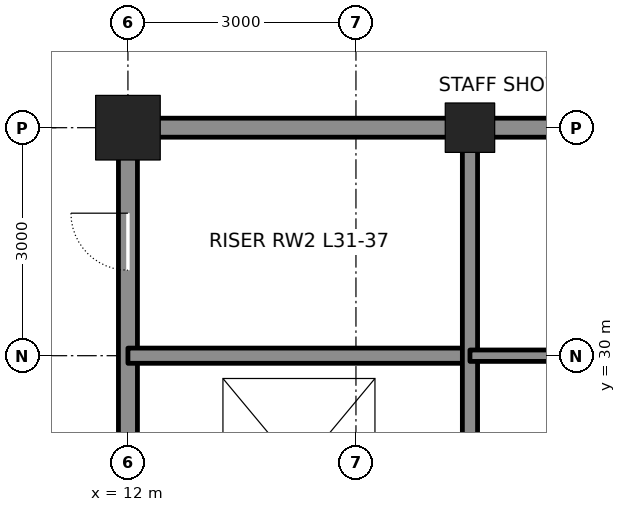
"""IFC4 building model, lengths in metres.
Left out: names, types, materials, properties, quantities, classifications, styles, units other than length and angle.
Written with IfcOpenShell. Run it as: python <this file> out.ifc"""

import sys

from ifc_helpers import new_model, si_unit, direction, frame, frame_2d, origin, origin_2d, place, context, subcontext, project, spatial, rectangle, hollow_rectangle, extrude, element, fill, save


model = new_model("IFC4")
c1 = context("Model", 3, precision=1e-05, world=origin(), true_north=direction((0.0, 1.0)))
c2 = subcontext(c1, "Body", "Model", "MODEL_VIEW")
j1 = project(units=[si_unit("LENGTHUNIT", "METRE"), si_unit("PLANEANGLEUNIT", "RADIAN")], contexts=[c1])
p1 = place(None, origin())
s1 = spatial("IfcSite", under=j1, at=p1, CompositionType="ELEMENT")
p2 = place(p1, origin())
s2 = spatial("IfcBuilding", under=s1, at=p2, CompositionType="ELEMENT")
p3 = place(p2, frame((0.0, 0.0, 144.6)))
s3 = spatial("IfcBuildingStorey", under=s2, at=p3, CompositionType="ELEMENT", Elevation=144.6)
p4 = place(p3, frame((12.0, 33.0, 0.0), z_axis=(0.0, 0.0, 1.0), x_axis=(1.0, 0.0, 0.0)))
e1 = element("IfcColumn", 1, at=p4, inside=s3, PredefinedType="COLUMN", context=c2, shape_type="SweptSolid", body=[
    extrude(hollow_rectangle(XDim=0.85, YDim=0.85, WallThickness=0.085, at=origin_2d()), origin(), (0.0, 0.0, 1.0), 4.2),
])
p5 = place(p3, frame((16.5, 33.0, 0.0), z_axis=(0.0, 0.0, 1.0), x_axis=(1.0, 0.0, 0.0)))
e2 = element("IfcColumn", 2, at=p5, inside=s3, PredefinedType="COLUMN", context=c2, shape_type="SweptSolid", body=[
    extrude(hollow_rectangle(XDim=0.65, YDim=0.65, WallThickness=0.065, at=origin_2d()), origin(), (0.0, 0.0, 1.0), 4.2),
])
p6 = place(p3, frame((12.0, 24.25, 0.0), z_axis=(0.0, 0.0, 1.0), x_axis=(0.0, 1.0, 0.0)))
e3 = element("IfcWall", 3, at=p6, inside=s3, PredefinedType="SOLIDWALL", context=c2, shape_type="SweptSolid", body=[
    extrude(rectangle(XDim=8.5, YDim=0.25, at=frame_2d((4.25, 0.0))), origin(), (0.0, 0.0, 1.0), 3.113),
])
p7 = place(p6, frame((0.65, 0.0, 0.0)))
e4 = element("IfcOpeningElement", 4, at=p7, cuts=e3, PredefinedType="OPENING", context=c2, shape_type="SweptSolid", body=[
    extrude(rectangle(XDim=1.2, YDim=2.1, at=frame_2d((0.6, 1.05))), frame((0.0, 0.135, 0.0), z_axis=(0.0, -1.0, 0.0), x_axis=(1.0, 0.0, 0.0)), (0.0, 0.0, 1.0), 0.27),
])
p8 = place(p6, frame((6.875, 0.0, 0.0)))
e5 = element("IfcOpeningElement", 5, at=p8, cuts=e3, PredefinedType="OPENING", context=c2, shape_type="SweptSolid", body=[
    extrude(rectangle(XDim=0.75, YDim=2.1, at=frame_2d((0.375, 1.05))), frame((0.0, 0.135, 0.0), z_axis=(0.0, -1.0, 0.0), x_axis=(1.0, 0.0, 0.0)), (0.0, 0.0, 1.0), 0.27),
])
p9 = place(p3, frame((12.0, 30.0, 0.0), z_axis=(0.0, 0.0, 1.0), x_axis=(1.0, 0.0, 0.0)))
e6 = element("IfcWall", 6, at=p9, inside=s3, PredefinedType="SOLIDWALL", context=c2, shape_type="SweptSolid", body=[
    extrude(rectangle(XDim=4.5, YDim=0.2, at=frame_2d((2.25, 0.0))), origin(), (0.0, 0.0, 1.0), 4.04),
])
p10 = place(p3, frame((12.25, 33.0, 0.0), z_axis=(0.0, 0.0, 1.0), x_axis=(1.0, 0.0, 0.0)))
e7 = element("IfcWall", 7, at=p10, inside=s3, PredefinedType="SOLIDWALL", context=c2, shape_type="SweptSolid", body=[
    extrude(rectangle(XDim=4.0, YDim=0.25, at=frame_2d((2.0, 0.0))), origin(), (0.0, 0.0, 1.0), 3.181),
])
p11 = place(p3, frame((16.75, 33.0, 0.0), z_axis=(0.0, 0.0, 1.0), x_axis=(1.0, 0.0, 0.0)))
e8 = element("IfcWall", 8, at=p11, inside=s3, PredefinedType="SOLIDWALL", context=c2, shape_type="SweptSolid", body=[
    extrude(rectangle(XDim=2.5, YDim=0.25, at=frame_2d((1.25, 0.0))), origin(), (0.0, 0.0, 1.0), 3.181),
])
p12 = place(p3, frame((16.5, 24.25, 0.0), z_axis=(0.0, 0.0, 1.0), x_axis=(0.0, 1.0, 0.0)))
e9 = element("IfcWall", 9, at=p12, inside=s3, PredefinedType="SOLIDWALL", context=c2, shape_type="SweptSolid", body=[
    extrude(rectangle(XDim=8.5, YDim=0.2, at=frame_2d((4.25, 0.0))), origin(), (0.0, 0.0, 1.0), 3.113),
])
p13 = place(p3, frame((16.5, 30.0, 0.0), z_axis=(0.0, 0.0, 1.0), x_axis=(1.0, 0.0, 0.0)))
e10 = element("IfcWall", 10, at=p13, inside=s3, PredefinedType="PARTITIONING", context=c2, shape_type="SweptSolid", body=[
    extrude(rectangle(XDim=3.0, YDim=0.15, at=frame_2d((1.5, 0.0))), origin(), (0.0, 0.0, 1.0), 4.04),
])
p14 = place(p8, origin())
e11 = element("IfcDoor", 11, at=p14, inside=s3, OperationType="SINGLE_SWING_RIGHT", PredefinedType="DOOR", context=c2, shape_type="SweptSolid", body=[
    extrude(rectangle(XDim=0.75, YDim=2.1, at=frame_2d((0.375, 1.05))), frame((0.0, 0.025, 0.0), z_axis=(0.0, -1.0, 0.0), x_axis=(1.0, 0.0, 0.0)), (0.0, 0.0, 1.0), 0.05),
])
fill(e5, e11)
save(model, sys.argv[1])
